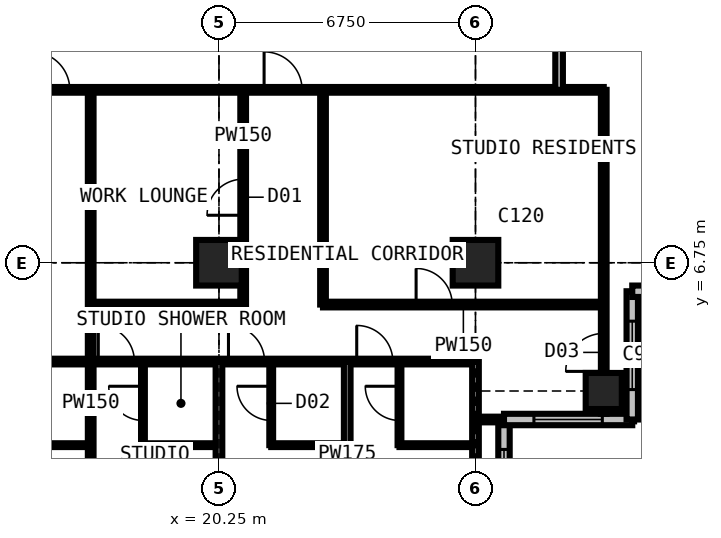
"""IFC4 building model, lengths in metres.
Left out: names, types, materials, properties, quantities, classifications, styles, units other than length and angle.
Written with IfcOpenShell. Run it as: python <this file> out.ifc"""

import sys

from ifc_helpers import new_model, si_unit, direction, frame, frame_2d, origin, origin_2d, place, context, subcontext, project, spatial, rectangle, extrude, element, fill, save


model = new_model("IFC4")
c1 = context("Model", 3, precision=1e-05, world=origin(), true_north=direction((0.0, 1.0)))
c2 = subcontext(c1, "Body", "Model", "MODEL_VIEW")
j1 = project(units=[si_unit("LENGTHUNIT", "METRE"), si_unit("PLANEANGLEUNIT", "RADIAN")], contexts=[c1])
p1 = place(None, origin())
s1 = spatial("IfcSite", under=j1, at=p1, CompositionType="ELEMENT")
p2 = place(p1, origin())
s2 = spatial("IfcBuilding", under=s1, at=p2, CompositionType="ELEMENT")
p3 = place(p2, frame((0.0, 0.0, 185.4)))
s3 = spatial("IfcBuildingStorey", under=s2, at=p3, CompositionType="ELEMENT", Elevation=185.4)
for number, where, z_axis, x_axis in (
    (1, (20.25, 6.75, 0.0), (0.0, 0.0, 1.0), (1.0, 0.0, 0.0)),
    (2, (27.0, 6.75, 0.0), (0.0, 0.0, 1.0), (1.0, 0.0, 0.0)),
):
    element("IfcColumn", number, at=place(p3, frame(where, z_axis=z_axis, x_axis=x_axis)), inside=s3, PredefinedType="COLUMN", context=c2, shape_type="SweptSolid", body=[
        extrude(rectangle(XDim=1.2, YDim=1.2, at=origin_2d()), origin(), (0.0, 0.0, 1.0), 3.6),
    ])
p4 = place(p3, frame((30.375, 3.375, 0.0), z_axis=(0.0, 0.0, 1.0), x_axis=(1.0, 0.0, 0.0)))
e3 = element("IfcColumn", 3, at=p4, inside=s3, PredefinedType="COLUMN", context=c2, shape_type="SweptSolid", body=[
    extrude(rectangle(XDim=0.95, YDim=0.95, at=origin_2d()), origin(), (0.0, 0.0, 1.0), 3.6),
])
p5 = place(p3, frame((27.75, -0.75, 0.0), z_axis=(0.0, 0.0, 1.0), x_axis=(0.0, 1.0, 0.0)))
e4 = element("IfcWall", 4, at=p5, inside=s3, PredefinedType="SOLIDWALL", context=c2, shape_type="SweptSolid", body=[
    extrude(rectangle(XDim=3.375, YDim=0.3, at=frame_2d((1.688, 0.0))), origin(), (0.0, 0.0, 1.0), 3.375),
])
p6 = place(p5, frame((0.788, 0.0, 0.6)))
e5 = element("IfcOpeningElement", 5, at=p6, cuts=e4, PredefinedType="OPENING", context=c2, shape_type="SweptSolid", body=[
    extrude(rectangle(XDim=1.8, YDim=2.1, at=frame_2d((0.9, 1.05))), frame((0.0, 0.16, 0.0), z_axis=(0.0, -1.0, 0.0), x_axis=(1.0, 0.0, 0.0)), (0.0, 0.0, 1.0), 0.32),
])
p7 = place(p3, frame((27.75, 2.625, 0.0), z_axis=(0.0, 0.0, 1.0), x_axis=(1.0, 0.0, 0.0)))
e6 = element("IfcWall", 6, at=p7, inside=s3, PredefinedType="SOLIDWALL", context=c2, shape_type="SweptSolid", body=[
    extrude(rectangle(XDim=3.375, YDim=0.3, at=frame_2d((1.688, 0.0))), origin(), (0.0, 0.0, 1.0), 3.375),
])
p8 = place(p7, frame((0.788, 0.0, 0.6)))
e7 = element("IfcOpeningElement", 7, at=p8, cuts=e6, PredefinedType="OPENING", context=c2, shape_type="SweptSolid", body=[
    extrude(rectangle(XDim=1.8, YDim=2.1, at=frame_2d((0.9, 1.05))), frame((0.0, 0.16, 0.0), z_axis=(0.0, -1.0, 0.0), x_axis=(1.0, 0.0, 0.0)), (0.0, 0.0, 1.0), 0.32),
])
p9 = place(p3, frame((31.125, 2.625, 0.0), z_axis=(0.0, 0.0, 1.0), x_axis=(0.0, 1.0, 0.0)))
e8 = element("IfcWall", 8, at=p9, inside=s3, PredefinedType="SOLIDWALL", context=c2, shape_type="SweptSolid", body=[
    extrude(rectangle(XDim=3.375, YDim=0.3, at=frame_2d((1.688, 0.0))), origin(), (0.0, 0.0, 1.0), 3.375),
])
p10 = place(p9, frame((0.788, 0.0, 0.6)))
e9 = element("IfcOpeningElement", 9, at=p10, cuts=e8, PredefinedType="OPENING", context=c2, shape_type="SweptSolid", body=[
    extrude(rectangle(XDim=1.8, YDim=2.1, at=frame_2d((0.9, 1.05))), frame((0.0, 0.16, 0.0), z_axis=(0.0, -1.0, 0.0), x_axis=(1.0, 0.0, 0.0)), (0.0, 0.0, 1.0), 0.32),
])
p11 = place(p3, frame((31.125, 6.0, 0.0), z_axis=(0.0, 0.0, 1.0), x_axis=(1.0, 0.0, 0.0)))
e10 = element("IfcWall", 10, at=p11, inside=s3, PredefinedType="SOLIDWALL", context=c2, shape_type="SweptSolid", body=[
    extrude(rectangle(XDim=3.375, YDim=0.3, at=frame_2d((1.688, 0.0))), origin(), (0.0, 0.0, 1.0), 3.375),
])
p12 = place(p11, frame((0.788, 0.0, 0.6)))
e11 = element("IfcOpeningElement", 11, at=p12, cuts=e10, PredefinedType="OPENING", context=c2, shape_type="SweptSolid", body=[
    extrude(rectangle(XDim=1.8, YDim=2.1, at=frame_2d((0.9, 1.05))), frame((0.0, 0.16, 0.0), z_axis=(0.0, -1.0, 0.0), x_axis=(1.0, 0.0, 0.0)), (0.0, 0.0, 1.0), 0.32),
])
p13 = place(p3, frame((6.75, 4.15, 0.0), z_axis=(0.0, 0.0, 1.0), x_axis=(1.0, 0.0, 0.0)))
e12 = element("IfcWall", 12, at=p13, inside=s3, PredefinedType="PARTITIONING", context=c2, shape_type="SweptSolid", body=[
    extrude(rectangle(XDim=20.25, YDim=0.15, at=frame_2d((10.125, 0.0))), origin(), (0.0, 0.0, 1.0), 3.375),
])
p14 = place(p13, frame((1.2, 0.0, 0.0)))
e13 = element("IfcOpeningElement", 13, at=p14, cuts=e12, PredefinedType="OPENING", context=c2, shape_type="SweptSolid", body=[
    extrude(rectangle(XDim=1.0, YDim=2.2, at=frame_2d((0.5, 1.1))), frame((0.0, 0.085, 0.0), z_axis=(0.0, -1.0, 0.0), x_axis=(1.0, 0.0, 0.0)), (0.0, 0.0, 1.0), 0.17),
])
p15 = place(p13, frame((3.575, 0.0, 0.0)))
e14 = element("IfcOpeningElement", 14, at=p15, cuts=e12, PredefinedType="OPENING", context=c2, shape_type="SweptSolid", body=[
    extrude(rectangle(XDim=0.95, YDim=2.2, at=frame_2d((0.475, 1.1))), frame((0.0, 0.085, 0.0), z_axis=(0.0, -1.0, 0.0), x_axis=(1.0, 0.0, 0.0)), (0.0, 0.0, 1.0), 0.17),
])
p16 = place(p13, frame((7.0, 0.0, 0.0)))
e15 = element("IfcOpeningElement", 15, at=p16, cuts=e12, PredefinedType="OPENING", context=c2, shape_type="SweptSolid", body=[
    extrude(rectangle(XDim=0.95, YDim=2.2, at=frame_2d((0.475, 1.1))), frame((0.0, 0.085, 0.0), z_axis=(0.0, -1.0, 0.0), x_axis=(1.0, 0.0, 0.0)), (0.0, 0.0, 1.0), 0.17),
])
p17 = place(p13, frame((10.325, 0.0, 0.0)))
e16 = element("IfcOpeningElement", 16, at=p17, cuts=e12, PredefinedType="OPENING", context=c2, shape_type="SweptSolid", body=[
    extrude(rectangle(XDim=0.95, YDim=2.2, at=frame_2d((0.475, 1.1))), frame((0.0, 0.085, 0.0), z_axis=(0.0, -1.0, 0.0), x_axis=(1.0, 0.0, 0.0)), (0.0, 0.0, 1.0), 0.17),
])
p18 = place(p13, frame((13.75, 0.0, 0.0)))
e17 = element("IfcOpeningElement", 17, at=p18, cuts=e12, PredefinedType="OPENING", context=c2, shape_type="SweptSolid", body=[
    extrude(rectangle(XDim=0.95, YDim=2.2, at=frame_2d((0.475, 1.1))), frame((0.0, 0.085, 0.0), z_axis=(0.0, -1.0, 0.0), x_axis=(1.0, 0.0, 0.0)), (0.0, 0.0, 1.0), 0.17),
])
p19 = place(p13, frame((17.125, 0.0, 0.0)))
e18 = element("IfcOpeningElement", 18, at=p19, cuts=e12, PredefinedType="OPENING", context=c2, shape_type="SweptSolid", body=[
    extrude(rectangle(XDim=0.95, YDim=2.2, at=frame_2d((0.475, 1.1))), frame((0.0, 0.085, 0.0), z_axis=(0.0, -1.0, 0.0), x_axis=(1.0, 0.0, 0.0)), (0.0, 0.0, 1.0), 0.17),
])
p20 = place(p3, frame((10.125, 11.3, 0.0), z_axis=(0.0, 0.0, 1.0), x_axis=(1.0, 0.0, 0.0)))
e19 = element("IfcWall", 19, at=p20, inside=s3, PredefinedType="PARTITIONING", context=c2, shape_type="SweptSolid", body=[
    extrude(rectangle(XDim=20.25, YDim=0.15, at=frame_2d((10.125, 0.0))), origin(), (0.0, 0.0, 1.0), 3.375),
])
p21 = place(p20, frame((5.2, 0.0, 0.0)))
e20 = element("IfcOpeningElement", 20, at=p21, cuts=e19, PredefinedType="OPENING", context=c2, shape_type="SweptSolid", body=[
    extrude(rectangle(XDim=1.0, YDim=2.2, at=frame_2d((0.5, 1.1))), frame((0.0, 0.085, 0.0), z_axis=(0.0, -1.0, 0.0), x_axis=(1.0, 0.0, 0.0)), (0.0, 0.0, 1.0), 0.17),
])
p22 = place(p20, frame((11.312, 0.0, 0.0)))
e21 = element("IfcOpeningElement", 21, at=p22, cuts=e19, PredefinedType="OPENING", context=c2, shape_type="SweptSolid", body=[
    extrude(rectangle(XDim=1.0, YDim=2.2, at=frame_2d((0.5, 1.1))), frame((0.0, 0.085, 0.0), z_axis=(0.0, -1.0, 0.0), x_axis=(1.0, 0.0, 0.0)), (0.0, 0.0, 1.0), 0.17),
])
p23 = place(p20, frame((3.325, 0.0, 0.0)))
e22 = element("IfcOpeningElement", 22, at=p23, cuts=e19, PredefinedType="OPENING", context=c2, shape_type="SweptSolid", body=[
    extrude(rectangle(XDim=0.95, YDim=2.2, at=frame_2d((0.475, 1.1))), frame((0.0, 0.085, 0.0), z_axis=(0.0, -1.0, 0.0), x_axis=(1.0, 0.0, 0.0)), (0.0, 0.0, 1.0), 0.17),
])
p24 = place(p3, frame((14.875, 1.95, 0.0), z_axis=(0.0, 0.0, 1.0), x_axis=(1.0, 0.0, 0.0)))
e23 = element("IfcWall", 23, at=p24, inside=s3, PredefinedType="PARTITIONING", context=c2, shape_type="SweptSolid", body=[
    extrude(rectangle(XDim=2.0, YDim=0.1, at=frame_2d((1.0, 0.0))), origin(), (0.0, 0.0, 1.0), 3.375),
])
p25 = place(p3, frame((16.875, -0.734, 0.0), z_axis=(0.0, 0.0, 1.0), x_axis=(0.0, 1.0, 0.0)))
e24 = element("IfcWall", 24, at=p25, inside=s3, PredefinedType="PARTITIONING", context=c2, shape_type="SweptSolid", body=[
    extrude(rectangle(XDim=12.034, YDim=0.15, at=frame_2d((6.017, 0.0))), origin(), (0.0, 0.0, 1.0), 3.375),
])
p26 = place(p3, frame((16.875, 5.65, 0.0), z_axis=(0.0, 0.0, 1.0), x_axis=(1.0, 0.0, 0.0)))
e25 = element("IfcWall", 25, at=p26, inside=s3, PredefinedType="PARTITIONING", context=c2, shape_type="SweptSolid", body=[
    extrude(rectangle(XDim=4.012, YDim=0.15, at=frame_2d((2.006, 0.0))), origin(), (0.0, 0.0, 1.0), 3.375),
])
p27 = place(p3, frame((18.25, 1.95, 0.0), z_axis=(0.0, 0.0, 1.0), x_axis=(0.0, 1.0, 0.0)))
e26 = element("IfcWall", 26, at=p27, inside=s3, PredefinedType="PARTITIONING", context=c2, shape_type="SweptSolid", body=[
    extrude(rectangle(XDim=2.2, YDim=0.1, at=frame_2d((1.1, 0.0))), origin(), (0.0, 0.0, 1.0), 3.375),
])
p28 = place(p27, frame((0.65, 0.0, 0.0)))
e27 = element("IfcOpeningElement", 27, at=p28, cuts=e26, PredefinedType="OPENING", context=c2, shape_type="SweptSolid", body=[
    extrude(rectangle(XDim=0.9, YDim=2.2, at=frame_2d((0.45, 1.1))), frame((0.0, 0.06, 0.0), z_axis=(0.0, -1.0, 0.0), x_axis=(1.0, 0.0, 0.0)), (0.0, 0.0, 1.0), 0.12),
])
p29 = place(p3, frame((18.25, 1.95, 0.0), z_axis=(0.0, 0.0, 1.0), x_axis=(1.0, 0.0, 0.0)))
e28 = element("IfcWall", 28, at=p29, inside=s3, PredefinedType="PARTITIONING", context=c2, shape_type="SweptSolid", body=[
    extrude(rectangle(XDim=2.0, YDim=0.1, at=frame_2d((1.0, 0.0))), origin(), (0.0, 0.0, 1.0), 3.375),
])
p30 = place(p3, frame((20.25, -0.734, 0.0), z_axis=(0.0, 0.0, 1.0), x_axis=(0.0, 1.0, 0.0)))
e29 = element("IfcWall", 29, at=p30, inside=s3, PredefinedType="PARTITIONING", context=c2, shape_type="SweptSolid", body=[
    extrude(rectangle(XDim=4.884, YDim=0.175, at=frame_2d((2.442, 0.0))), origin(), (0.0, 0.0, 1.0), 2.877),
])
p31 = place(p3, frame((20.887, 5.65, 0.0), z_axis=(0.0, 0.0, 1.0), x_axis=(0.0, 1.0, 0.0)))
e30 = element("IfcWall", 30, at=p31, inside=s3, PredefinedType="PARTITIONING", context=c2, shape_type="SweptSolid", body=[
    extrude(rectangle(XDim=5.65, YDim=0.15, at=frame_2d((2.825, 0.0))), origin(), (0.0, 0.0, 1.0), 3.375),
])
p32 = place(p31, frame((2.35, 0.0, 0.0)))
e31 = element("IfcOpeningElement", 31, at=p32, cuts=e30, PredefinedType="OPENING", context=c2, shape_type="SweptSolid", body=[
    extrude(rectangle(XDim=0.95, YDim=2.2, at=frame_2d((0.475, 1.1))), frame((0.0, 0.085, 0.0), z_axis=(0.0, -1.0, 0.0), x_axis=(1.0, 0.0, 0.0)), (0.0, 0.0, 1.0), 0.17),
])
p33 = place(p3, frame((21.625, 1.95, 0.0), z_axis=(0.0, 0.0, 1.0), x_axis=(0.0, 1.0, 0.0)))
e32 = element("IfcWall", 32, at=p33, inside=s3, PredefinedType="PARTITIONING", context=c2, shape_type="SweptSolid", body=[
    extrude(rectangle(XDim=2.2, YDim=0.1, at=frame_2d((1.1, 0.0))), origin(), (0.0, 0.0, 1.0), 3.375),
])
p34 = place(p33, frame((0.65, 0.0, 0.0)))
e33 = element("IfcOpeningElement", 33, at=p34, cuts=e32, PredefinedType="OPENING", context=c2, shape_type="SweptSolid", body=[
    extrude(rectangle(XDim=0.9, YDim=2.2, at=frame_2d((0.45, 1.1))), frame((0.0, 0.06, 0.0), z_axis=(0.0, -1.0, 0.0), x_axis=(1.0, 0.0, 0.0)), (0.0, 0.0, 1.0), 0.12),
])
p35 = place(p3, frame((21.625, 1.95, 0.0), z_axis=(0.0, 0.0, 1.0), x_axis=(1.0, 0.0, 0.0)))
e34 = element("IfcWall", 34, at=p35, inside=s3, PredefinedType="PARTITIONING", context=c2, shape_type="SweptSolid", body=[
    extrude(rectangle(XDim=2.0, YDim=0.1, at=frame_2d((1.0, 0.0))), origin(), (0.0, 0.0, 1.0), 3.375),
])
p36 = place(p3, frame((22.988, 5.65, 0.0), z_axis=(0.0, 0.0, 1.0), x_axis=(1.0, 0.0, 0.0)))
e35 = element("IfcWall", 35, at=p36, inside=s3, PredefinedType="PARTITIONING", context=c2, shape_type="SweptSolid", body=[
    extrude(rectangle(XDim=7.387, YDim=0.15, at=frame_2d((3.694, 0.0))), origin(), (0.0, 0.0, 1.0), 3.375),
])
p37 = place(p36, frame((2.45, 0.0, 0.0)))
e36 = element("IfcOpeningElement", 36, at=p37, cuts=e35, PredefinedType="OPENING", context=c2, shape_type="SweptSolid", body=[
    extrude(rectangle(XDim=0.95, YDim=2.2, at=frame_2d((0.475, 1.1))), frame((0.0, 0.085, 0.0), z_axis=(0.0, -1.0, 0.0), x_axis=(1.0, 0.0, 0.0)), (0.0, 0.0, 1.0), 0.17),
])
p38 = place(p3, frame((22.988, 5.65, 0.0), z_axis=(0.0, 0.0, 1.0), x_axis=(0.0, 1.0, 0.0)))
e37 = element("IfcWall", 37, at=p38, inside=s3, PredefinedType="PARTITIONING", context=c2, shape_type="SweptSolid", body=[
    extrude(rectangle(XDim=5.65, YDim=0.15, at=frame_2d((2.825, 0.0))), origin(), (0.0, 0.0, 1.0), 3.375),
])
p39 = place(p3, frame((23.625, -0.734, 0.0), z_axis=(0.0, 0.0, 1.0), x_axis=(0.0, 1.0, 0.0)))
e38 = element("IfcWall", 38, at=p39, inside=s3, PredefinedType="PARTITIONING", context=c2, shape_type="SweptSolid", body=[
    extrude(rectangle(XDim=4.884, YDim=0.175, at=frame_2d((2.442, 0.0))), origin(), (0.0, 0.0, 1.0), 3.375),
])
p40 = place(p3, frame((25.0, 1.95, 0.0), z_axis=(0.0, 0.0, 1.0), x_axis=(0.0, 1.0, 0.0)))
e39 = element("IfcWall", 39, at=p40, inside=s3, PredefinedType="PARTITIONING", context=c2, shape_type="SweptSolid", body=[
    extrude(rectangle(XDim=2.2, YDim=0.1, at=frame_2d((1.1, 0.0))), origin(), (0.0, 0.0, 1.0), 3.375),
])
p41 = place(p40, frame((0.65, 0.0, 0.0)))
e40 = element("IfcOpeningElement", 40, at=p41, cuts=e39, PredefinedType="OPENING", context=c2, shape_type="SweptSolid", body=[
    extrude(rectangle(XDim=0.9, YDim=2.2, at=frame_2d((0.45, 1.1))), frame((0.0, 0.06, 0.0), z_axis=(0.0, -1.0, 0.0), x_axis=(1.0, 0.0, 0.0)), (0.0, 0.0, 1.0), 0.12),
])
p42 = place(p3, frame((25.0, 1.95, 0.0), z_axis=(0.0, 0.0, 1.0), x_axis=(1.0, 0.0, 0.0)))
e41 = element("IfcWall", 41, at=p42, inside=s3, PredefinedType="PARTITIONING", context=c2, shape_type="SweptSolid", body=[
    extrude(rectangle(XDim=2.0, YDim=0.1, at=frame_2d((1.0, 0.0))), origin(), (0.0, 0.0, 1.0), 3.375),
])
p43 = place(p3, frame((27.0, -0.734, 0.0), z_axis=(0.0, 0.0, 1.0), x_axis=(0.0, 1.0, 0.0)))
e42 = element("IfcWall", 42, at=p43, inside=s3, PredefinedType="PARTITIONING", context=c2, shape_type="SweptSolid", body=[
    extrude(rectangle(XDim=4.884, YDim=0.175, at=frame_2d((2.442, 0.0))), origin(), (0.0, 0.0, 1.0), 2.877),
])
p44 = place(p3, frame((27.0, 2.625, 0.0), z_axis=(0.0, 0.0, 1.0), x_axis=(1.0, 0.0, 0.0)))
e43 = element("IfcWall", 43, at=p44, inside=s3, PredefinedType="PARTITIONING", context=c2, shape_type="SweptSolid", body=[
    extrude(rectangle(XDim=0.734, YDim=0.15, at=frame_2d((0.367, 0.0))), origin(), (0.0, 0.0, 1.0), 3.375),
])
p45 = place(p3, frame((29.2, 11.3, 0.0), z_axis=(0.0, 0.0, 1.0), x_axis=(0.0, 1.0, 0.0)))
e44 = element("IfcWall", 44, at=p45, inside=s3, PredefinedType="PARTITIONING", context=c2, shape_type="SweptSolid", body=[
    extrude(rectangle(XDim=17.9, YDim=0.2, at=frame_2d((8.95, 0.0))), origin(), (0.0, 0.0, 1.0), 3.375),
])
p46 = place(p45, frame((10.55, 0.0, 0.0)))
e45 = element("IfcOpeningElement", 45, at=p46, cuts=e44, PredefinedType="OPENING", context=c2, shape_type="SweptSolid", body=[
    extrude(rectangle(XDim=0.95, YDim=2.2, at=frame_2d((0.475, 1.1))), frame((0.0, 0.11, 0.0), z_axis=(0.0, -1.0, 0.0), x_axis=(1.0, 0.0, 0.0)), (0.0, 0.0, 1.0), 0.22),
])
p47 = place(p45, frame((5.775, 0.0, 0.0)))
e46 = element("IfcOpeningElement", 46, at=p47, cuts=e44, PredefinedType="OPENING", context=c2, shape_type="SweptSolid", body=[
    extrude(rectangle(XDim=0.95, YDim=2.2, at=frame_2d((0.475, 1.1))), frame((0.0, 0.11, 0.0), z_axis=(0.0, -1.0, 0.0), x_axis=(1.0, 0.0, 0.0)), (0.0, 0.0, 1.0), 0.22),
])
p48 = place(p45, frame((16.3, 0.0, 0.0)))
e47 = element("IfcOpeningElement", 47, at=p48, cuts=e44, PredefinedType="OPENING", context=c2, shape_type="SweptSolid", body=[
    extrude(rectangle(XDim=1.0, YDim=2.2, at=frame_2d((0.5, 1.1))), frame((0.0, 0.11, 0.0), z_axis=(0.0, -1.0, 0.0), x_axis=(1.0, 0.0, 0.0)), (0.0, 0.0, 1.0), 0.22),
])
p49 = place(p3, frame((30.375, 2.775, 0.0), z_axis=(0.0, 0.0, 1.0), x_axis=(0.0, 1.0, 0.0)))
e48 = element("IfcWall", 48, at=p49, inside=s3, PredefinedType="PARTITIONING", context=c2, shape_type="SweptSolid", body=[
    extrude(rectangle(XDim=8.525, YDim=0.15, at=frame_2d((4.263, 0.0))), origin(), (0.0, 0.0, 1.0), 2.877),
])
p50 = place(p49, frame((1.116, 0.0, 0.0)))
e49 = element("IfcOpeningElement", 49, at=p50, cuts=e48, PredefinedType="OPENING", context=c2, shape_type="SweptSolid", body=[
    extrude(rectangle(XDim=1.0, YDim=2.2, at=frame_2d((0.5, 1.1))), frame((0.0, 0.085, 0.0), z_axis=(0.0, -1.0, 0.0), x_axis=(1.0, 0.0, 0.0)), (0.0, 0.0, 1.0), 0.17),
])
p51 = place(p6, origin())
e50 = element("IfcWindow", 50, at=p51, inside=s3, PartitioningType="SINGLE_PANEL", PredefinedType="WINDOW", context=c2, shape_type="SweptSolid", body=[
    extrude(rectangle(XDim=1.8, YDim=2.1, at=frame_2d((0.9, 1.05))), frame((0.0, 0.03, 0.0), z_axis=(0.0, -1.0, 0.0), x_axis=(1.0, 0.0, 0.0)), (0.0, 0.0, 1.0), 0.06),
])
fill(e5, e50)
p52 = place(p8, origin())
e51 = element("IfcWindow", 51, at=p52, inside=s3, PartitioningType="SINGLE_PANEL", PredefinedType="WINDOW", context=c2, shape_type="SweptSolid", body=[
    extrude(rectangle(XDim=1.8, YDim=2.1, at=frame_2d((0.9, 1.05))), frame((0.0, 0.03, 0.0), z_axis=(0.0, -1.0, 0.0), x_axis=(1.0, 0.0, 0.0)), (0.0, 0.0, 1.0), 0.06),
])
fill(e7, e51)
p53 = place(p10, origin())
e52 = element("IfcWindow", 52, at=p53, inside=s3, PartitioningType="SINGLE_PANEL", PredefinedType="WINDOW", context=c2, shape_type="SweptSolid", body=[
    extrude(rectangle(XDim=1.8, YDim=2.1, at=frame_2d((0.9, 1.05))), frame((0.0, 0.03, 0.0), z_axis=(0.0, -1.0, 0.0), x_axis=(1.0, 0.0, 0.0)), (0.0, 0.0, 1.0), 0.06),
])
fill(e9, e52)
p54 = place(p21, origin())
e53 = element("IfcDoor", 53, at=p54, inside=s3, OperationType="SINGLE_SWING_LEFT", PredefinedType="DOOR", context=c2, shape_type="SweptSolid", body=[
    extrude(rectangle(XDim=1.0, YDim=2.2, at=frame_2d((0.5, 1.1))), frame((0.0, 0.025, 0.0), z_axis=(0.0, -1.0, 0.0), x_axis=(1.0, 0.0, 0.0)), (0.0, 0.0, 1.0), 0.05),
])
fill(e20, e53)
p55 = place(p17, origin())
e54 = element("IfcDoor", 54, at=p55, inside=s3, OperationType="SINGLE_SWING_LEFT", PredefinedType="DOOR", context=c2, shape_type="SweptSolid", body=[
    extrude(rectangle(XDim=0.95, YDim=2.2, at=frame_2d((0.475, 1.1))), frame((0.0, 0.025, 0.0), z_axis=(0.0, -1.0, 0.0), x_axis=(1.0, 0.0, 0.0)), (0.0, 0.0, 1.0), 0.05),
])
fill(e16, e54)
p56 = place(p28, origin())
e55 = element("IfcDoor", 55, at=p56, inside=s3, OperationType="SINGLE_SWING_RIGHT", PredefinedType="DOOR", context=c2, shape_type="SweptSolid", body=[
    extrude(rectangle(XDim=0.9, YDim=2.2, at=frame_2d((0.45, 1.1))), frame((0.0, 0.025, 0.0), z_axis=(0.0, -1.0, 0.0), x_axis=(1.0, 0.0, 0.0)), (0.0, 0.0, 1.0), 0.05),
])
fill(e27, e55)
p57 = place(p18, origin())
e56 = element("IfcDoor", 56, at=p57, inside=s3, OperationType="SINGLE_SWING_LEFT", PredefinedType="DOOR", context=c2, shape_type="SweptSolid", body=[
    extrude(rectangle(XDim=0.95, YDim=2.2, at=frame_2d((0.475, 1.1))), frame((0.0, 0.025, 0.0), z_axis=(0.0, -1.0, 0.0), x_axis=(1.0, 0.0, 0.0)), (0.0, 0.0, 1.0), 0.05),
])
fill(e17, e56)
p58 = place(p34, origin())
e57 = element("IfcDoor", 57, at=p58, inside=s3, OperationType="SINGLE_SWING_RIGHT", PredefinedType="DOOR", context=c2, shape_type="SweptSolid", body=[
    extrude(rectangle(XDim=0.9, YDim=2.2, at=frame_2d((0.45, 1.1))), frame((0.0, 0.025, 0.0), z_axis=(0.0, -1.0, 0.0), x_axis=(1.0, 0.0, 0.0)), (0.0, 0.0, 1.0), 0.05),
])
fill(e33, e57)
p59 = place(p19, origin())
e58 = element("IfcDoor", 58, at=p59, inside=s3, OperationType="SINGLE_SWING_LEFT", PredefinedType="DOOR", context=c2, shape_type="SweptSolid", body=[
    extrude(rectangle(XDim=0.95, YDim=2.2, at=frame_2d((0.475, 1.1))), frame((0.0, 0.025, 0.0), z_axis=(0.0, -1.0, 0.0), x_axis=(1.0, 0.0, 0.0)), (0.0, 0.0, 1.0), 0.05),
])
fill(e18, e58)
p60 = place(p41, origin())
e59 = element("IfcDoor", 59, at=p60, inside=s3, OperationType="SINGLE_SWING_RIGHT", PredefinedType="DOOR", context=c2, shape_type="SweptSolid", body=[
    extrude(rectangle(XDim=0.9, YDim=2.2, at=frame_2d((0.45, 1.1))), frame((0.0, 0.025, 0.0), z_axis=(0.0, -1.0, 0.0), x_axis=(1.0, 0.0, 0.0)), (0.0, 0.0, 1.0), 0.05),
])
fill(e40, e59)
p61 = place(p22, origin())
e60 = element("IfcDoor", 60, at=p61, inside=s3, OperationType="SINGLE_SWING_LEFT", PredefinedType="DOOR", context=c2, shape_type="SweptSolid", body=[
    extrude(rectangle(XDim=1.0, YDim=2.2, at=frame_2d((0.5, 1.1))), frame((0.0, 0.025, 0.0), z_axis=(0.0, -1.0, 0.0), x_axis=(1.0, 0.0, 0.0)), (0.0, 0.0, 1.0), 0.05),
])
fill(e21, e60)
p62 = place(p32, origin())
e61 = element("IfcDoor", 61, at=p62, inside=s3, OperationType="SINGLE_SWING_LEFT", PredefinedType="DOOR", context=c2, shape_type="SweptSolid", body=[
    extrude(rectangle(XDim=0.95, YDim=2.2, at=frame_2d((0.475, 1.1))), frame((0.0, 0.025, 0.0), z_axis=(0.0, -1.0, 0.0), x_axis=(1.0, 0.0, 0.0)), (0.0, 0.0, 1.0), 0.05),
])
fill(e31, e61)
p63 = place(p37, origin())
e62 = element("IfcDoor", 62, at=p63, inside=s3, OperationType="SINGLE_SWING_LEFT", PredefinedType="DOOR", context=c2, shape_type="SweptSolid", body=[
    extrude(rectangle(XDim=0.95, YDim=2.2, at=frame_2d((0.475, 1.1))), frame((0.0, 0.025, 0.0), z_axis=(0.0, -1.0, 0.0), x_axis=(1.0, 0.0, 0.0)), (0.0, 0.0, 1.0), 0.05),
])
fill(e36, e62)
p64 = place(p50, origin())
e63 = element("IfcDoor", 63, at=p64, inside=s3, OperationType="SINGLE_SWING_LEFT", PredefinedType="DOOR", context=c2, shape_type="SweptSolid", body=[
    extrude(rectangle(XDim=1.0, YDim=2.2, at=frame_2d((0.5, 1.1))), frame((0.0, 0.025, 0.0), z_axis=(0.0, -1.0, 0.0), x_axis=(1.0, 0.0, 0.0)), (0.0, 0.0, 1.0), 0.05),
])
fill(e49, e63)
save(model, sys.argv[1])
